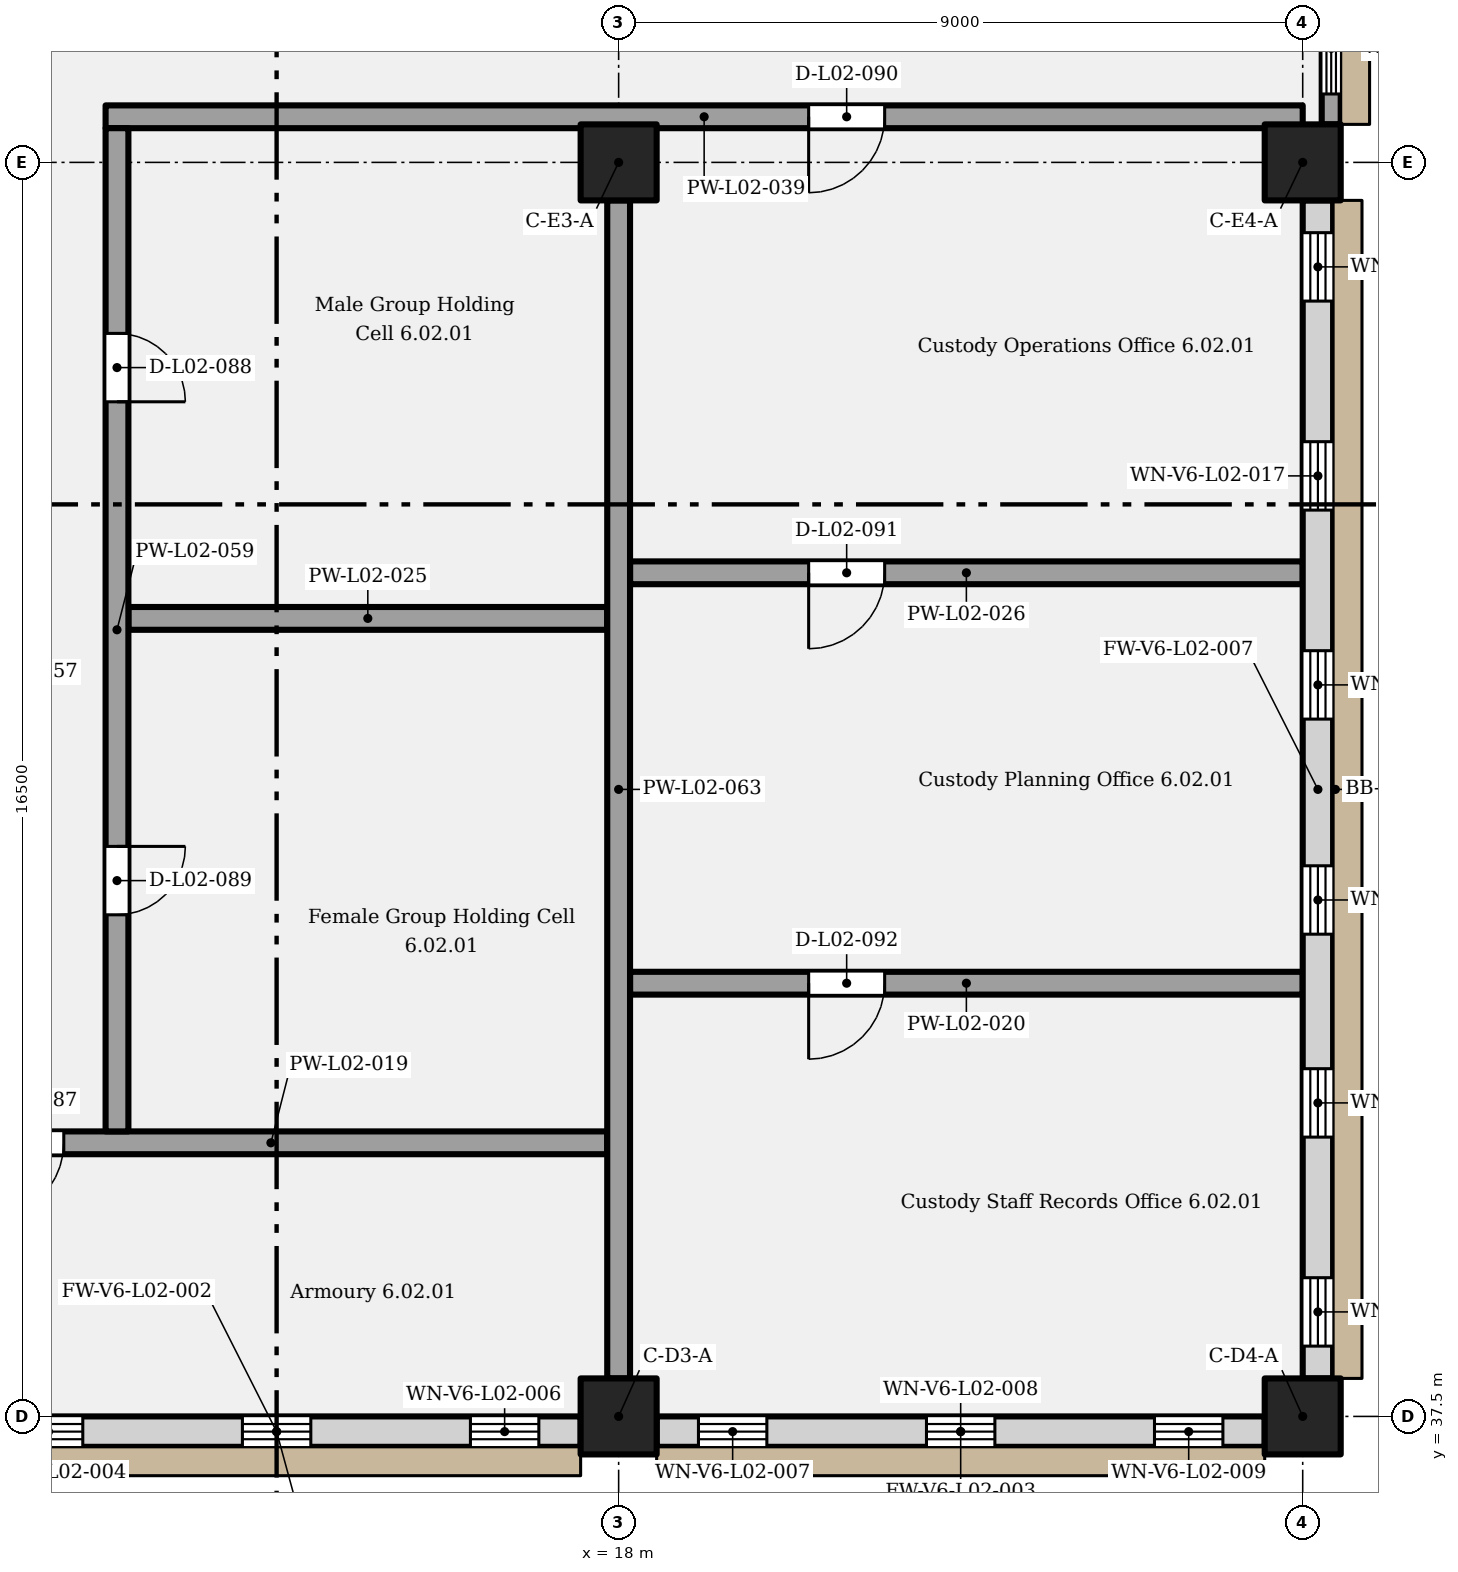
"""IFC4 building model, lengths in metres.
Left out: names, types, materials, properties, quantities, classifications, styles, units other than length and angle.
Written with IfcOpenShell. Run it as: python <this file> out.ifc"""

import sys

from ifc_helpers import new_model, si_unit, direction, frame, frame_2d, origin, origin_2d, place, context, subcontext, project, spatial, rectangle, extrude, element, fill, save


model = new_model("IFC4")
c1 = context("Model", 3, precision=1e-05, world=origin(), true_north=direction((0.0, 1.0)))
c2 = subcontext(c1, "Body", "Model", "MODEL_VIEW")
j1 = project(units=[si_unit("LENGTHUNIT", "METRE"), si_unit("PLANEANGLEUNIT", "RADIAN")], contexts=[c1])
p1 = place(None, origin())
s1 = spatial("IfcSite", under=j1, at=p1, CompositionType="ELEMENT")
p2 = place(p1, origin())
s2 = spatial("IfcBuilding", under=s1, at=p2, CompositionType="ELEMENT")
p3 = place(p2, frame((0.0, 0.0, 12.0)))
s3 = spatial("IfcBuildingStorey", under=s2, at=p3, CompositionType="ELEMENT", Elevation=12.0)
for number, where, z_axis, x_axis in (
    (1, (18.0, 37.5, 0.0), (0.0, 0.0, 1.0), (1.0, 0.0, 0.0)),
    (2, (27.0, 37.5, 0.0), (0.0, 0.0, 1.0), (1.0, 0.0, 0.0)),
    (3, (18.0, 54.0, 0.0), (0.0, 0.0, 1.0), (1.0, 0.0, 0.0)),
    (4, (27.0, 54.0, 0.0), (0.0, 0.0, 1.0), (1.0, 0.0, 0.0)),
):
    element("IfcColumn", number, at=place(p3, frame(where, z_axis=z_axis, x_axis=x_axis)), inside=s3, PredefinedType="COLUMN", context=c2, shape_type="SweptSolid", body=[
        extrude(rectangle(XDim=1.0, YDim=1.0, at=origin_2d()), origin(), (0.0, 0.0, 1.0), 5.4),
    ])
p4 = place(p3, frame((9.5, 37.3, 0.0), z_axis=(0.0, 0.0, 1.0), x_axis=(1.0, 0.0, 0.0)))
e5 = element("IfcWall", 5, at=p4, inside=s3, PredefinedType="SOLIDWALL", context=c2, shape_type="SweptSolid", body=[
    extrude(rectangle(XDim=8.0, YDim=0.4, at=frame_2d((4.0, 0.0))), origin(), (0.0, 0.0, 1.0), 5.15),
])
p5 = place(p4, frame((0.55, 0.0, 1.5)))
e6 = element("IfcOpeningElement", 6, at=p5, cuts=e5, PredefinedType="OPENING", context=c2, shape_type="SweptSolid", body=[
    extrude(rectangle(XDim=0.9, YDim=1.8, at=frame_2d((0.45, 0.9))), frame((0.0, 0.21, 0.0), z_axis=(0.0, -1.0, 0.0), x_axis=(1.0, 0.0, 0.0)), (0.0, 0.0, 1.0), 0.42),
])
p6 = place(p4, frame((3.55, 0.0, 1.5)))
e7 = element("IfcOpeningElement", 7, at=p6, cuts=e5, PredefinedType="OPENING", context=c2, shape_type="SweptSolid", body=[
    extrude(rectangle(XDim=0.9, YDim=1.8, at=frame_2d((0.45, 0.9))), frame((0.0, 0.21, 0.0), z_axis=(0.0, -1.0, 0.0), x_axis=(1.0, 0.0, 0.0)), (0.0, 0.0, 1.0), 0.42),
])
p7 = place(p4, frame((6.55, 0.0, 1.5)))
e8 = element("IfcOpeningElement", 8, at=p7, cuts=e5, PredefinedType="OPENING", context=c2, shape_type="SweptSolid", body=[
    extrude(rectangle(XDim=0.9, YDim=1.8, at=frame_2d((0.45, 0.9))), frame((0.0, 0.21, 0.0), z_axis=(0.0, -1.0, 0.0), x_axis=(1.0, 0.0, 0.0)), (0.0, 0.0, 1.0), 0.42),
])
p8 = place(p3, frame((18.5, 37.3, 0.0), z_axis=(0.0, 0.0, 1.0), x_axis=(1.0, 0.0, 0.0)))
e9 = element("IfcWall", 9, at=p8, inside=s3, PredefinedType="SOLIDWALL", context=c2, shape_type="SweptSolid", body=[
    extrude(rectangle(XDim=8.0, YDim=0.4, at=frame_2d((4.0, 0.0))), origin(), (0.0, 0.0, 1.0), 5.15),
])
p9 = place(p8, frame((0.55, 0.0, 1.5)))
e10 = element("IfcOpeningElement", 10, at=p9, cuts=e9, PredefinedType="OPENING", context=c2, shape_type="SweptSolid", body=[
    extrude(rectangle(XDim=0.9, YDim=1.8, at=frame_2d((0.45, 0.9))), frame((0.0, 0.21, 0.0), z_axis=(0.0, -1.0, 0.0), x_axis=(1.0, 0.0, 0.0)), (0.0, 0.0, 1.0), 0.42),
])
p10 = place(p8, frame((3.55, 0.0, 1.5)))
e11 = element("IfcOpeningElement", 11, at=p10, cuts=e9, PredefinedType="OPENING", context=c2, shape_type="SweptSolid", body=[
    extrude(rectangle(XDim=0.9, YDim=1.8, at=frame_2d((0.45, 0.9))), frame((0.0, 0.21, 0.0), z_axis=(0.0, -1.0, 0.0), x_axis=(1.0, 0.0, 0.0)), (0.0, 0.0, 1.0), 0.42),
])
p11 = place(p8, frame((6.55, 0.0, 1.5)))
e12 = element("IfcOpeningElement", 12, at=p11, cuts=e9, PredefinedType="OPENING", context=c2, shape_type="SweptSolid", body=[
    extrude(rectangle(XDim=0.9, YDim=1.8, at=frame_2d((0.45, 0.9))), frame((0.0, 0.21, 0.0), z_axis=(0.0, -1.0, 0.0), x_axis=(1.0, 0.0, 0.0)), (0.0, 0.0, 1.0), 0.42),
])
p12 = place(p3, frame((27.2, 38.0, 0.0), z_axis=(0.0, 0.0, 1.0), x_axis=(0.0, 1.0, 0.0)))
e13 = element("IfcWall", 13, at=p12, inside=s3, PredefinedType="SOLIDWALL", context=c2, shape_type="SweptSolid", body=[
    extrude(rectangle(XDim=15.5, YDim=0.4, at=frame_2d((7.75, 0.0))), origin(), (0.0, 0.0, 1.0), 5.15),
])
p13 = place(p12, frame((0.425, 0.0, 1.5)))
e14 = element("IfcOpeningElement", 14, at=p13, cuts=e13, PredefinedType="OPENING", context=c2, shape_type="SweptSolid", body=[
    extrude(rectangle(XDim=0.9, YDim=1.8, at=frame_2d((0.45, 0.9))), frame((0.0, 0.21, 0.0), z_axis=(0.0, -1.0, 0.0), x_axis=(1.0, 0.0, 0.0)), (0.0, 0.0, 1.0), 0.42),
])
p14 = place(p12, frame((3.175, 0.0, 1.5)))
e15 = element("IfcOpeningElement", 15, at=p14, cuts=e13, PredefinedType="OPENING", context=c2, shape_type="SweptSolid", body=[
    extrude(rectangle(XDim=0.9, YDim=1.8, at=frame_2d((0.45, 0.9))), frame((0.0, 0.21, 0.0), z_axis=(0.0, -1.0, 0.0), x_axis=(1.0, 0.0, 0.0)), (0.0, 0.0, 1.0), 0.42),
])
p15 = place(p12, frame((5.845, 0.0, 1.5)))
e16 = element("IfcOpeningElement", 16, at=p15, cuts=e13, PredefinedType="OPENING", context=c2, shape_type="SweptSolid", body=[
    extrude(rectangle(XDim=0.9, YDim=1.8, at=frame_2d((0.45, 0.9))), frame((0.0, 0.21, 0.0), z_axis=(0.0, -1.0, 0.0), x_axis=(1.0, 0.0, 0.0)), (0.0, 0.0, 1.0), 0.42),
])
p16 = place(p12, frame((8.675, 0.0, 1.5)))
e17 = element("IfcOpeningElement", 17, at=p16, cuts=e13, PredefinedType="OPENING", context=c2, shape_type="SweptSolid", body=[
    extrude(rectangle(XDim=0.9, YDim=1.8, at=frame_2d((0.45, 0.9))), frame((0.0, 0.21, 0.0), z_axis=(0.0, -1.0, 0.0), x_axis=(1.0, 0.0, 0.0)), (0.0, 0.0, 1.0), 0.42),
])
p17 = place(p12, frame((11.425, 0.0, 1.5)))
e18 = element("IfcOpeningElement", 18, at=p17, cuts=e13, PredefinedType="OPENING", context=c2, shape_type="SweptSolid", body=[
    extrude(rectangle(XDim=0.9, YDim=1.8, at=frame_2d((0.45, 0.9))), frame((0.0, 0.21, 0.0), z_axis=(0.0, -1.0, 0.0), x_axis=(1.0, 0.0, 0.0)), (0.0, 0.0, 1.0), 0.42),
])
p18 = place(p12, frame((14.175, 0.0, 1.5)))
e19 = element("IfcOpeningElement", 19, at=p18, cuts=e13, PredefinedType="OPENING", context=c2, shape_type="SweptSolid", body=[
    extrude(rectangle(XDim=0.9, YDim=1.8, at=frame_2d((0.45, 0.9))), frame((0.0, 0.21, 0.0), z_axis=(0.0, -1.0, 0.0), x_axis=(1.0, 0.0, 0.0)), (0.0, 0.0, 1.0), 0.42),
])
p19 = place(p3, frame((27.375, 54.5, 0.0), z_axis=(0.0, 0.0, 1.0), x_axis=(0.0, 1.0, 0.0)))
e20 = element("IfcWall", 20, at=p19, inside=s3, PredefinedType="SOLIDWALL", context=c2, shape_type="SweptSolid", body=[
    extrude(rectangle(XDim=11.05, YDim=0.25, at=frame_2d((5.525, 0.0))), origin(), (0.0, 0.0, 1.0), 5.15),
])
p20 = place(p19, frame((0.4, 0.0, 0.9)))
e21 = element("IfcOpeningElement", 21, at=p20, cuts=e20, PredefinedType="OPENING", context=c2, shape_type="SweptSolid", body=[
    extrude(rectangle(XDim=1.2, YDim=2.4, at=frame_2d((0.6, 1.2))), frame((0.0, 0.135, 0.0), z_axis=(0.0, -1.0, 0.0), x_axis=(1.0, 0.0, 0.0)), (0.0, 0.0, 1.0), 0.27),
])
p21 = place(p3, frame((9.0, 41.1, 0.0), z_axis=(0.0, 0.0, 1.0), x_axis=(1.0, 0.0, 0.0)))
e22 = element("IfcWall", 22, at=p21, inside=s3, PredefinedType="PARTITIONING", context=c2, shape_type="SweptSolid", body=[
    extrude(rectangle(XDim=8.85, YDim=0.3, at=frame_2d((4.425, 0.0))), origin(), (0.0, 0.0, 1.0), 5.15),
])
p22 = place(p21, frame((1.7, 0.0, 0.0), z_axis=(0.0, 0.0, 1.0), x_axis=(-1.0, 0.0, 0.0)))
e23 = element("IfcOpeningElement", 23, at=p22, cuts=e22, PredefinedType="OPENING", context=c2, shape_type="SweptSolid", body=[
    extrude(rectangle(XDim=1.0, YDim=2.1, at=frame_2d((0.5, 1.05))), frame((0.0, 0.16, 0.0), z_axis=(0.0, -1.0, 0.0), x_axis=(1.0, 0.0, 0.0)), (0.0, 0.0, 1.0), 0.32),
])
p23 = place(p3, frame((18.15, 43.2, 0.0), z_axis=(0.0, 0.0, 1.0), x_axis=(1.0, 0.0, 0.0)))
e24 = element("IfcWall", 24, at=p23, inside=s3, PredefinedType="PARTITIONING", context=c2, shape_type="SweptSolid", body=[
    extrude(rectangle(XDim=8.85, YDim=0.3, at=frame_2d((4.425, 0.0))), origin(), (0.0, 0.0, 1.0), 5.15),
])
p24 = place(p23, frame((3.35, 0.0, 0.0), z_axis=(0.0, 0.0, 1.0), x_axis=(-1.0, 0.0, 0.0)))
e25 = element("IfcOpeningElement", 25, at=p24, cuts=e24, PredefinedType="OPENING", context=c2, shape_type="SweptSolid", body=[
    extrude(rectangle(XDim=1.0, YDim=2.1, at=frame_2d((0.5, 1.05))), frame((0.0, 0.16, 0.0), z_axis=(0.0, -1.0, 0.0), x_axis=(1.0, 0.0, 0.0)), (0.0, 0.0, 1.0), 0.32),
])
p25 = place(p3, frame((11.55, 48.0, 0.0), z_axis=(0.0, 0.0, 1.0), x_axis=(1.0, 0.0, 0.0)))
e26 = element("IfcWall", 26, at=p25, inside=s3, PredefinedType="PARTITIONING", context=c2, shape_type="SweptSolid", body=[
    extrude(rectangle(XDim=6.3, YDim=0.3, at=frame_2d((3.15, 0.0))), origin(), (0.0, 0.0, 1.0), 5.15),
])
p26 = place(p3, frame((18.15, 48.6, 0.0), z_axis=(0.0, 0.0, 1.0), x_axis=(1.0, 0.0, 0.0)))
e27 = element("IfcWall", 27, at=p26, inside=s3, PredefinedType="PARTITIONING", context=c2, shape_type="SweptSolid", body=[
    extrude(rectangle(XDim=8.85, YDim=0.3, at=frame_2d((4.425, 0.0))), origin(), (0.0, 0.0, 1.0), 5.15),
])
p27 = place(p26, frame((3.35, 0.0, 0.0), z_axis=(0.0, 0.0, 1.0), x_axis=(-1.0, 0.0, 0.0)))
e28 = element("IfcOpeningElement", 28, at=p27, cuts=e27, PredefinedType="OPENING", context=c2, shape_type="SweptSolid", body=[
    extrude(rectangle(XDim=1.0, YDim=2.1, at=frame_2d((0.5, 1.05))), frame((0.0, 0.16, 0.0), z_axis=(0.0, -1.0, 0.0), x_axis=(1.0, 0.0, 0.0)), (0.0, 0.0, 1.0), 0.32),
])
p28 = place(p3, frame((11.25, 54.6, 0.0), z_axis=(0.0, 0.0, 1.0), x_axis=(1.0, 0.0, 0.0)))
e29 = element("IfcWall", 29, at=p28, inside=s3, PredefinedType="PARTITIONING", context=c2, shape_type="SweptSolid", body=[
    extrude(rectangle(XDim=15.75, YDim=0.3, at=frame_2d((7.875, 0.0))), origin(), (0.0, 0.0, 1.0), 5.15),
])
p29 = place(p28, frame((10.25, 0.0, 0.0), z_axis=(0.0, 0.0, 1.0), x_axis=(-1.0, 0.0, 0.0)))
e30 = element("IfcOpeningElement", 30, at=p29, cuts=e29, PredefinedType="OPENING", context=c2, shape_type="SweptSolid", body=[
    extrude(rectangle(XDim=1.0, YDim=2.1, at=frame_2d((0.5, 1.05))), frame((0.0, 0.16, 0.0), z_axis=(0.0, -1.0, 0.0), x_axis=(1.0, 0.0, 0.0)), (0.0, 0.0, 1.0), 0.32),
])
p30 = place(p3, frame((11.4, 41.25, 0.0), z_axis=(0.0, 0.0, 1.0), x_axis=(0.0, 1.0, 0.0)))
e31 = element("IfcWall", 31, at=p30, inside=s3, PredefinedType="PARTITIONING", context=c2, shape_type="SweptSolid", body=[
    extrude(rectangle(XDim=13.2, YDim=0.3, at=frame_2d((6.6, 0.0))), origin(), (0.0, 0.0, 1.0), 5.15),
])
p31 = place(p30, frame((10.5, 0.0, 0.0), z_axis=(0.0, 0.0, 1.0), x_axis=(-1.0, 0.0, 0.0)))
e32 = element("IfcOpeningElement", 32, at=p31, cuts=e31, PredefinedType="OPENING", context=c2, shape_type="SweptSolid", body=[
    extrude(rectangle(XDim=0.9, YDim=2.0, at=frame_2d((0.45, 1.0))), frame((0.0, 0.16, 0.0), z_axis=(0.0, -1.0, 0.0), x_axis=(1.0, 0.0, 0.0)), (0.0, 0.0, 1.0), 0.32),
])
p32 = place(p30, frame((3.75, 0.0, 0.0), z_axis=(0.0, 0.0, 1.0), x_axis=(-1.0, 0.0, 0.0)))
e33 = element("IfcOpeningElement", 33, at=p32, cuts=e31, PredefinedType="OPENING", context=c2, shape_type="SweptSolid", body=[
    extrude(rectangle(XDim=0.9, YDim=2.0, at=frame_2d((0.45, 1.0))), frame((0.0, 0.16, 0.0), z_axis=(0.0, -1.0, 0.0), x_axis=(1.0, 0.0, 0.0)), (0.0, 0.0, 1.0), 0.32),
])
p33 = place(p3, frame((18.0, 38.0, 0.0), z_axis=(0.0, 0.0, 1.0), x_axis=(0.0, 1.0, 0.0)))
e34 = element("IfcWall", 34, at=p33, inside=s3, PredefinedType="PARTITIONING", context=c2, shape_type="SweptSolid", body=[
    extrude(rectangle(XDim=15.5, YDim=0.3, at=frame_2d((7.75, 0.0))), origin(), (0.0, 0.0, 1.0), 4.2),
])
p34 = place(p5, origin())
e35 = element("IfcWindow", 35, at=p34, inside=s3, PartitioningType="SINGLE_PANEL", PredefinedType="WINDOW", context=c2, shape_type="SweptSolid", body=[
    extrude(rectangle(XDim=0.9, YDim=1.8, at=frame_2d((0.45, 0.9))), frame((0.0, 0.03, 0.0), z_axis=(0.0, -1.0, 0.0), x_axis=(1.0, 0.0, 0.0)), (0.0, 0.0, 1.0), 0.06),
])
fill(e6, e35)
p35 = place(p6, origin())
e36 = element("IfcWindow", 36, at=p35, inside=s3, PartitioningType="SINGLE_PANEL", PredefinedType="WINDOW", context=c2, shape_type="SweptSolid", body=[
    extrude(rectangle(XDim=0.9, YDim=1.8, at=frame_2d((0.45, 0.9))), frame((0.0, 0.03, 0.0), z_axis=(0.0, -1.0, 0.0), x_axis=(1.0, 0.0, 0.0)), (0.0, 0.0, 1.0), 0.06),
])
fill(e7, e36)
p36 = place(p7, origin())
e37 = element("IfcWindow", 37, at=p36, inside=s3, PartitioningType="SINGLE_PANEL", PredefinedType="WINDOW", context=c2, shape_type="SweptSolid", body=[
    extrude(rectangle(XDim=0.9, YDim=1.8, at=frame_2d((0.45, 0.9))), frame((0.0, 0.03, 0.0), z_axis=(0.0, -1.0, 0.0), x_axis=(1.0, 0.0, 0.0)), (0.0, 0.0, 1.0), 0.06),
])
fill(e8, e37)
p37 = place(p9, origin())
e38 = element("IfcWindow", 38, at=p37, inside=s3, PartitioningType="SINGLE_PANEL", PredefinedType="WINDOW", context=c2, shape_type="SweptSolid", body=[
    extrude(rectangle(XDim=0.9, YDim=1.8, at=frame_2d((0.45, 0.9))), frame((0.0, 0.03, 0.0), z_axis=(0.0, -1.0, 0.0), x_axis=(1.0, 0.0, 0.0)), (0.0, 0.0, 1.0), 0.06),
])
fill(e10, e38)
p38 = place(p10, origin())
e39 = element("IfcWindow", 39, at=p38, inside=s3, PartitioningType="SINGLE_PANEL", PredefinedType="WINDOW", context=c2, shape_type="SweptSolid", body=[
    extrude(rectangle(XDim=0.9, YDim=1.8, at=frame_2d((0.45, 0.9))), frame((0.0, 0.03, 0.0), z_axis=(0.0, -1.0, 0.0), x_axis=(1.0, 0.0, 0.0)), (0.0, 0.0, 1.0), 0.06),
])
fill(e11, e39)
p39 = place(p11, origin())
e40 = element("IfcWindow", 40, at=p39, inside=s3, PartitioningType="SINGLE_PANEL", PredefinedType="WINDOW", context=c2, shape_type="SweptSolid", body=[
    extrude(rectangle(XDim=0.9, YDim=1.8, at=frame_2d((0.45, 0.9))), frame((0.0, 0.03, 0.0), z_axis=(0.0, -1.0, 0.0), x_axis=(1.0, 0.0, 0.0)), (0.0, 0.0, 1.0), 0.06),
])
fill(e12, e40)
p40 = place(p13, origin())
e41 = element("IfcWindow", 41, at=p40, inside=s3, PartitioningType="SINGLE_PANEL", PredefinedType="WINDOW", context=c2, shape_type="SweptSolid", body=[
    extrude(rectangle(XDim=0.9, YDim=1.8, at=frame_2d((0.45, 0.9))), frame((0.0, 0.03, 0.0), z_axis=(0.0, -1.0, 0.0), x_axis=(1.0, 0.0, 0.0)), (0.0, 0.0, 1.0), 0.06),
])
fill(e14, e41)
p41 = place(p14, origin())
e42 = element("IfcWindow", 42, at=p41, inside=s3, PartitioningType="SINGLE_PANEL", PredefinedType="WINDOW", context=c2, shape_type="SweptSolid", body=[
    extrude(rectangle(XDim=0.9, YDim=1.8, at=frame_2d((0.45, 0.9))), frame((0.0, 0.03, 0.0), z_axis=(0.0, -1.0, 0.0), x_axis=(1.0, 0.0, 0.0)), (0.0, 0.0, 1.0), 0.06),
])
fill(e15, e42)
p42 = place(p15, origin())
e43 = element("IfcWindow", 43, at=p42, inside=s3, PartitioningType="SINGLE_PANEL", PredefinedType="WINDOW", context=c2, shape_type="SweptSolid", body=[
    extrude(rectangle(XDim=0.9, YDim=1.8, at=frame_2d((0.45, 0.9))), frame((0.0, 0.03, 0.0), z_axis=(0.0, -1.0, 0.0), x_axis=(1.0, 0.0, 0.0)), (0.0, 0.0, 1.0), 0.06),
])
fill(e16, e43)
p43 = place(p16, origin())
e44 = element("IfcWindow", 44, at=p43, inside=s3, PartitioningType="SINGLE_PANEL", PredefinedType="WINDOW", context=c2, shape_type="SweptSolid", body=[
    extrude(rectangle(XDim=0.9, YDim=1.8, at=frame_2d((0.45, 0.9))), frame((0.0, 0.03, 0.0), z_axis=(0.0, -1.0, 0.0), x_axis=(1.0, 0.0, 0.0)), (0.0, 0.0, 1.0), 0.06),
])
fill(e17, e44)
p44 = place(p17, origin())
e45 = element("IfcWindow", 45, at=p44, inside=s3, PartitioningType="SINGLE_PANEL", PredefinedType="WINDOW", context=c2, shape_type="SweptSolid", body=[
    extrude(rectangle(XDim=0.9, YDim=1.8, at=frame_2d((0.45, 0.9))), frame((0.0, 0.03, 0.0), z_axis=(0.0, -1.0, 0.0), x_axis=(1.0, 0.0, 0.0)), (0.0, 0.0, 1.0), 0.06),
])
fill(e18, e45)
p45 = place(p18, origin())
e46 = element("IfcWindow", 46, at=p45, inside=s3, PartitioningType="SINGLE_PANEL", PredefinedType="WINDOW", context=c2, shape_type="SweptSolid", body=[
    extrude(rectangle(XDim=0.9, YDim=1.8, at=frame_2d((0.45, 0.9))), frame((0.0, 0.03, 0.0), z_axis=(0.0, -1.0, 0.0), x_axis=(1.0, 0.0, 0.0)), (0.0, 0.0, 1.0), 0.06),
])
fill(e19, e46)
p46 = place(p20, origin())
e47 = element("IfcWindow", 47, at=p46, inside=s3, PartitioningType="SINGLE_PANEL", PredefinedType="WINDOW", context=c2, shape_type="SweptSolid", body=[
    extrude(rectangle(XDim=1.2, YDim=2.4, at=frame_2d((0.6, 1.2))), frame((0.0, 0.03, 0.0), z_axis=(0.0, -1.0, 0.0), x_axis=(1.0, 0.0, 0.0)), (0.0, 0.0, 1.0), 0.06),
])
fill(e21, e47)
p47 = place(p22, origin())
e48 = element("IfcDoor", 48, at=p47, inside=s3, OperationType="SINGLE_SWING_RIGHT", PredefinedType="DOOR", context=c2, shape_type="SweptSolid", body=[
    extrude(rectangle(XDim=1.0, YDim=2.1, at=frame_2d((0.5, 1.05))), frame((0.0, 0.025, 0.0), z_axis=(0.0, -1.0, 0.0), x_axis=(1.0, 0.0, 0.0)), (0.0, 0.0, 1.0), 0.05),
])
fill(e23, e48)
p48 = place(p31, origin())
e49 = element("IfcDoor", 49, at=p48, inside=s3, OperationType="SINGLE_SWING_RIGHT", PredefinedType="DOOR", context=c2, shape_type="SweptSolid", body=[
    extrude(rectangle(XDim=0.9, YDim=2.0, at=frame_2d((0.45, 1.0))), frame((0.0, 0.025, 0.0), z_axis=(0.0, -1.0, 0.0), x_axis=(1.0, 0.0, 0.0)), (0.0, 0.0, 1.0), 0.05),
])
fill(e32, e49)
p49 = place(p32, origin())
e50 = element("IfcDoor", 50, at=p49, inside=s3, OperationType="SINGLE_SWING_LEFT", PredefinedType="DOOR", context=c2, shape_type="SweptSolid", body=[
    extrude(rectangle(XDim=0.9, YDim=2.0, at=frame_2d((0.45, 1.0))), frame((0.0, 0.025, 0.0), z_axis=(0.0, -1.0, 0.0), x_axis=(1.0, 0.0, 0.0)), (0.0, 0.0, 1.0), 0.05),
])
fill(e33, e50)
p50 = place(p29, origin())
e51 = element("IfcDoor", 51, at=p50, inside=s3, OperationType="SINGLE_SWING_RIGHT", PredefinedType="DOOR", context=c2, shape_type="SweptSolid", body=[
    extrude(rectangle(XDim=1.0, YDim=2.1, at=frame_2d((0.5, 1.05))), frame((0.0, 0.025, 0.0), z_axis=(0.0, -1.0, 0.0), x_axis=(1.0, 0.0, 0.0)), (0.0, 0.0, 1.0), 0.05),
])
fill(e30, e51)
p51 = place(p27, origin())
e52 = element("IfcDoor", 52, at=p51, inside=s3, OperationType="SINGLE_SWING_RIGHT", PredefinedType="DOOR", context=c2, shape_type="SweptSolid", body=[
    extrude(rectangle(XDim=1.0, YDim=2.1, at=frame_2d((0.5, 1.05))), frame((0.0, 0.025, 0.0), z_axis=(0.0, -1.0, 0.0), x_axis=(1.0, 0.0, 0.0)), (0.0, 0.0, 1.0), 0.05),
])
fill(e28, e52)
p52 = place(p24, origin())
e53 = element("IfcDoor", 53, at=p52, inside=s3, OperationType="SINGLE_SWING_RIGHT", PredefinedType="DOOR", context=c2, shape_type="SweptSolid", body=[
    extrude(rectangle(XDim=1.0, YDim=2.1, at=frame_2d((0.5, 1.05))), frame((0.0, 0.025, 0.0), z_axis=(0.0, -1.0, 0.0), x_axis=(1.0, 0.0, 0.0)), (0.0, 0.0, 1.0), 0.05),
])
fill(e25, e53)
save(model, sys.argv[1])
